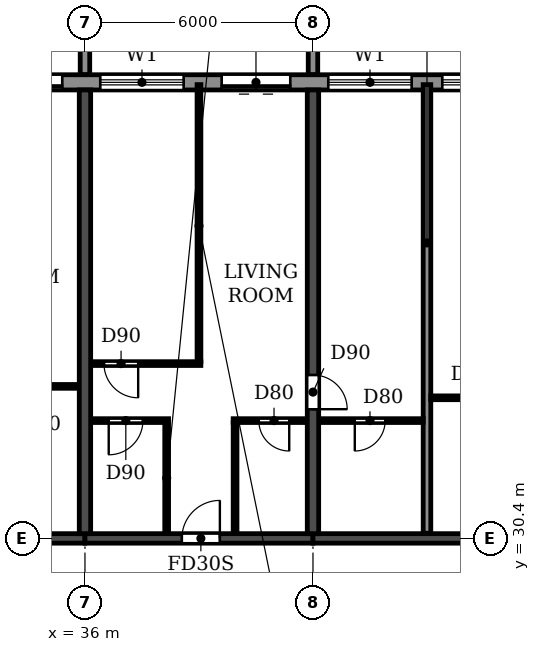
"""IFC4 building model, lengths in metres.
Left out: names, types, materials, properties, quantities, classifications, styles, units other than length and angle.
Written with IfcOpenShell. Run it as: python <this file> out.ifc"""

import sys

from ifc_helpers import new_model, si_unit, direction, frame, frame_2d, origin, place, context, subcontext, project, spatial, polyline, rectangle, outline, extrude, source, transform, mapped, element, fill, save


model = new_model("IFC4")
c1 = context("Model", 3, precision=1e-05, world=origin(), true_north=direction((0.0, 1.0)))
c2 = subcontext(c1, "Body", "Model", "MODEL_VIEW")
j1 = project(units=[si_unit("LENGTHUNIT", "METRE"), si_unit("PLANEANGLEUNIT", "RADIAN")], contexts=[c1])
p1 = place(None, origin())
s1 = spatial("IfcSite", under=j1, at=p1, CompositionType="ELEMENT")
p2 = place(p1, origin())
s2 = spatial("IfcBuilding", under=s1, at=p2, CompositionType="ELEMENT")
p3 = place(p2, frame((0.0, 0.0, 125.7)))
s3 = spatial("IfcBuildingStorey", under=s2, at=p3, CompositionType="ELEMENT", Elevation=125.7)
p4 = place(p3, frame((36.0, 30.525, 0.0), z_axis=(0.0, 0.0, 1.0), x_axis=(0.0, 1.0, 0.0)))
e1 = element("IfcWall", 1, at=p4, inside=s3, PredefinedType="SHEAR", context=c2, shape_type="SweptSolid", body=[
    extrude(rectangle(XDim=11.675, YDim=0.3, at=frame_2d((5.837, 0.0))), origin(), (0.0, 0.0, 1.0), 3.07),
])
p5 = place(p3, frame((42.0, 30.525, 0.0), z_axis=(0.0, 0.0, 1.0), x_axis=(0.0, 1.0, 0.0)))
e2 = element("IfcWall", 2, at=p5, inside=s3, PredefinedType="SHEAR", context=c2, shape_type="SweptSolid", body=[
    extrude(rectangle(XDim=11.675, YDim=0.3, at=frame_2d((5.837, 0.0))), origin(), (0.0, 0.0, 1.0), 3.07),
])
p6 = place(p5, frame((3.275, 0.0, 0.0)))
e3 = element("IfcOpeningElement", 3, at=p6, cuts=e2, PredefinedType="OPENING", context=c2, shape_type="SweptSolid", body=[
    extrude(rectangle(XDim=0.9, YDim=2.1, at=frame_2d((0.45, 1.05))), frame((0.0, 0.16, 0.0), z_axis=(0.0, -1.0, 0.0), x_axis=(1.0, 0.0, 0.0)), (0.0, 0.0, 1.0), 0.32),
])
p7 = place(p3, frame((30.0, 30.4, 0.0), z_axis=(0.0, 0.0, 1.0), x_axis=(1.0, 0.0, 0.0)))
e4 = element("IfcWall", 4, at=p7, inside=s3, PredefinedType="SHEAR", context=c2, shape_type="SweptSolid", body=[
    extrude(rectangle(XDim=6.0, YDim=0.25, at=frame_2d((3.0, 0.0))), origin(), (0.0, 0.0, 1.0), 2.47),
])
p8 = place(p7, frame((2.45, 0.0, 0.0)))
e5 = element("IfcOpeningElement", 5, at=p8, cuts=e4, PredefinedType="OPENING", context=c2, shape_type="SweptSolid", body=[
    extrude(rectangle(XDim=1.0, YDim=2.1, at=frame_2d((0.5, 1.05))), frame((0.0, 0.135, 0.0), z_axis=(0.0, -1.0, 0.0), x_axis=(1.0, 0.0, 0.0)), (0.0, 0.0, 1.0), 0.27),
])
p9 = place(p3, frame((36.0, 30.4, 0.0), z_axis=(0.0, 0.0, 1.0), x_axis=(1.0, 0.0, 0.0)))
e6 = element("IfcWall", 6, at=p9, inside=s3, PredefinedType="SHEAR", context=c2, shape_type="SweptSolid", body=[
    extrude(rectangle(XDim=6.0, YDim=0.25, at=frame_2d((3.0, 0.0))), origin(), (0.0, 0.0, 1.0), 2.47),
])
p10 = place(p9, frame((2.55, 0.0, 0.0)))
e7 = element("IfcOpeningElement", 7, at=p10, cuts=e6, PredefinedType="OPENING", context=c2, shape_type="SweptSolid", body=[
    extrude(rectangle(XDim=1.0, YDim=2.1, at=frame_2d((0.5, 1.05))), frame((0.0, 0.135, 0.0), z_axis=(0.0, -1.0, 0.0), x_axis=(1.0, 0.0, 0.0)), (0.0, 0.0, 1.0), 0.27),
])
p11 = place(p3, frame((42.0, 30.4, 0.0), z_axis=(0.0, 0.0, 1.0), x_axis=(1.0, 0.0, 0.0)))
e8 = element("IfcWall", 8, at=p11, inside=s3, PredefinedType="SHEAR", context=c2, shape_type="SweptSolid", body=[
    extrude(rectangle(XDim=6.0, YDim=0.25, at=frame_2d((3.0, 0.0))), origin(), (0.0, 0.0, 1.0), 2.47),
])
p12 = place(p3, frame((85.317, 42.4, 0.0), z_axis=(0.0, 0.0, 1.0), x_axis=(-1.0, 0.0, 0.0)))
e9 = element("IfcWall", 9, at=p12, inside=s3, PredefinedType="STANDARD", context=c2, shape_type="SweptSolid", body=[
    extrude(rectangle(XDim=68.634, YDim=0.4, at=frame_2d((34.317, 0.0))), origin(), (0.0, 0.0, 1.0), 3.07),
])
p13 = place(p12, frame((64.717, 0.0, 0.9)))
e10 = element("IfcOpeningElement", 10, at=p13, cuts=e9, PredefinedType="OPENING", context=c2, shape_type="SweptSolid", body=[
    extrude(rectangle(XDim=2.2, YDim=1.5, at=frame_2d((1.1, 0.75))), frame((0.0, 0.21, 0.0), z_axis=(0.0, -1.0, 0.0), x_axis=(1.0, 0.0, 0.0)), (0.0, 0.0, 1.0), 0.42),
])
p14 = place(p12, frame((61.917, 0.0, 0.0)))
e11 = element("IfcOpeningElement", 11, at=p14, cuts=e9, PredefinedType="OPENING", context=c2, shape_type="SweptSolid", body=[
    extrude(rectangle(XDim=1.8, YDim=2.4, at=frame_2d((0.9, 1.2))), frame((0.0, 0.21, 0.0), z_axis=(0.0, -1.0, 0.0), x_axis=(1.0, 0.0, 0.0)), (0.0, 0.0, 1.0), 0.42),
])
p15 = place(p12, frame((58.717, 0.0, 0.9)))
e12 = element("IfcOpeningElement", 12, at=p15, cuts=e9, PredefinedType="OPENING", context=c2, shape_type="SweptSolid", body=[
    extrude(rectangle(XDim=2.2, YDim=1.5, at=frame_2d((1.1, 0.75))), frame((0.0, 0.21, 0.0), z_axis=(0.0, -1.0, 0.0), x_axis=(1.0, 0.0, 0.0)), (0.0, 0.0, 1.0), 0.42),
])
p16 = place(p12, frame((55.917, 0.0, 0.0)))
e13 = element("IfcOpeningElement", 13, at=p16, cuts=e9, PredefinedType="OPENING", context=c2, shape_type="SweptSolid", body=[
    extrude(rectangle(XDim=1.8, YDim=2.4, at=frame_2d((0.9, 1.2))), frame((0.0, 0.21, 0.0), z_axis=(0.0, -1.0, 0.0), x_axis=(1.0, 0.0, 0.0)), (0.0, 0.0, 1.0), 0.42),
])
p17 = place(p12, frame((52.717, 0.0, 0.9)))
e14 = element("IfcOpeningElement", 14, at=p17, cuts=e9, PredefinedType="OPENING", context=c2, shape_type="SweptSolid", body=[
    extrude(rectangle(XDim=2.2, YDim=1.5, at=frame_2d((1.1, 0.75))), frame((0.0, 0.21, 0.0), z_axis=(0.0, -1.0, 0.0), x_axis=(1.0, 0.0, 0.0)), (0.0, 0.0, 1.0), 0.42),
])
p18 = place(p12, frame((49.917, 0.0, 0.0)))
e15 = element("IfcOpeningElement", 15, at=p18, cuts=e9, PredefinedType="OPENING", context=c2, shape_type="SweptSolid", body=[
    extrude(rectangle(XDim=1.8, YDim=2.4, at=frame_2d((0.9, 1.2))), frame((0.0, 0.21, 0.0), z_axis=(0.0, -1.0, 0.0), x_axis=(1.0, 0.0, 0.0)), (0.0, 0.0, 1.0), 0.42),
])
p19 = place(p12, frame((46.717, 0.0, 0.9)))
e16 = element("IfcOpeningElement", 16, at=p19, cuts=e9, PredefinedType="OPENING", context=c2, shape_type="SweptSolid", body=[
    extrude(rectangle(XDim=2.2, YDim=1.5, at=frame_2d((1.1, 0.75))), frame((0.0, 0.21, 0.0), z_axis=(0.0, -1.0, 0.0), x_axis=(1.0, 0.0, 0.0)), (0.0, 0.0, 1.0), 0.42),
])
p20 = place(p12, frame((43.917, 0.0, 0.0)))
e17 = element("IfcOpeningElement", 17, at=p20, cuts=e9, PredefinedType="OPENING", context=c2, shape_type="SweptSolid", body=[
    extrude(rectangle(XDim=1.8, YDim=2.4, at=frame_2d((0.9, 1.2))), frame((0.0, 0.21, 0.0), z_axis=(0.0, -1.0, 0.0), x_axis=(1.0, 0.0, 0.0)), (0.0, 0.0, 1.0), 0.42),
])
p21 = place(p12, frame((40.717, 0.0, 0.9)))
e18 = element("IfcOpeningElement", 18, at=p21, cuts=e9, PredefinedType="OPENING", context=c2, shape_type="SweptSolid", body=[
    extrude(rectangle(XDim=2.2, YDim=1.5, at=frame_2d((1.1, 0.75))), frame((0.0, 0.21, 0.0), z_axis=(0.0, -1.0, 0.0), x_axis=(1.0, 0.0, 0.0)), (0.0, 0.0, 1.0), 0.42),
])
p22 = place(p12, frame((37.717, 0.0, 0.9)))
e19 = element("IfcOpeningElement", 19, at=p22, cuts=e9, PredefinedType="OPENING", context=c2, shape_type="SweptSolid", body=[
    extrude(rectangle(XDim=2.2, YDim=1.5, at=frame_2d((1.1, 0.75))), frame((0.0, 0.21, 0.0), z_axis=(0.0, -1.0, 0.0), x_axis=(1.0, 0.0, 0.0)), (0.0, 0.0, 1.0), 0.42),
])
p23 = place(p12, frame((34.917, 0.0, 0.0)))
e20 = element("IfcOpeningElement", 20, at=p23, cuts=e9, PredefinedType="OPENING", context=c2, shape_type="SweptSolid", body=[
    extrude(rectangle(XDim=1.8, YDim=2.4, at=frame_2d((0.9, 1.2))), frame((0.0, 0.21, 0.0), z_axis=(0.0, -1.0, 0.0), x_axis=(1.0, 0.0, 0.0)), (0.0, 0.0, 1.0), 0.42),
])
p24 = place(p12, frame((31.717, 0.0, 0.9)))
e21 = element("IfcOpeningElement", 21, at=p24, cuts=e9, PredefinedType="OPENING", context=c2, shape_type="SweptSolid", body=[
    extrude(rectangle(XDim=2.2, YDim=1.5, at=frame_2d((1.1, 0.75))), frame((0.0, 0.21, 0.0), z_axis=(0.0, -1.0, 0.0), x_axis=(1.0, 0.0, 0.0)), (0.0, 0.0, 1.0), 0.42),
])
p25 = place(p12, frame((28.717, 0.0, 0.9)))
e22 = element("IfcOpeningElement", 22, at=p25, cuts=e9, PredefinedType="OPENING", context=c2, shape_type="SweptSolid", body=[
    extrude(rectangle(XDim=2.2, YDim=1.5, at=frame_2d((1.1, 0.75))), frame((0.0, 0.21, 0.0), z_axis=(0.0, -1.0, 0.0), x_axis=(1.0, 0.0, 0.0)), (0.0, 0.0, 1.0), 0.42),
])
p26 = place(p12, frame((25.717, 0.0, 0.9)))
e23 = element("IfcOpeningElement", 23, at=p26, cuts=e9, PredefinedType="OPENING", context=c2, shape_type="SweptSolid", body=[
    extrude(rectangle(XDim=2.2, YDim=1.5, at=frame_2d((1.1, 0.75))), frame((0.0, 0.21, 0.0), z_axis=(0.0, -1.0, 0.0), x_axis=(1.0, 0.0, 0.0)), (0.0, 0.0, 1.0), 0.42),
])
p27 = place(p12, frame((22.717, 0.0, 0.9)))
e24 = element("IfcOpeningElement", 24, at=p27, cuts=e9, PredefinedType="OPENING", context=c2, shape_type="SweptSolid", body=[
    extrude(rectangle(XDim=2.2, YDim=1.5, at=frame_2d((1.1, 0.75))), frame((0.0, 0.21, 0.0), z_axis=(0.0, -1.0, 0.0), x_axis=(1.0, 0.0, 0.0)), (0.0, 0.0, 1.0), 0.42),
])
p28 = place(p12, frame((19.917, 0.0, 0.0)))
e25 = element("IfcOpeningElement", 25, at=p28, cuts=e9, PredefinedType="OPENING", context=c2, shape_type="SweptSolid", body=[
    extrude(rectangle(XDim=1.8, YDim=2.4, at=frame_2d((0.9, 1.2))), frame((0.0, 0.21, 0.0), z_axis=(0.0, -1.0, 0.0), x_axis=(1.0, 0.0, 0.0)), (0.0, 0.0, 1.0), 0.42),
])
p29 = place(p12, frame((16.917, 0.0, 0.0)))
e26 = element("IfcOpeningElement", 26, at=p29, cuts=e9, PredefinedType="OPENING", context=c2, shape_type="SweptSolid", body=[
    extrude(rectangle(XDim=1.8, YDim=2.4, at=frame_2d((0.9, 1.2))), frame((0.0, 0.21, 0.0), z_axis=(0.0, -1.0, 0.0), x_axis=(1.0, 0.0, 0.0)), (0.0, 0.0, 1.0), 0.42),
])
p30 = place(p12, frame((13.717, 0.0, 0.9)))
e27 = element("IfcOpeningElement", 27, at=p30, cuts=e9, PredefinedType="OPENING", context=c2, shape_type="SweptSolid", body=[
    extrude(rectangle(XDim=2.2, YDim=1.5, at=frame_2d((1.1, 0.75))), frame((0.0, 0.21, 0.0), z_axis=(0.0, -1.0, 0.0), x_axis=(1.0, 0.0, 0.0)), (0.0, 0.0, 1.0), 0.42),
])
p31 = place(p12, frame((10.717, 0.0, 0.9)))
e28 = element("IfcOpeningElement", 28, at=p31, cuts=e9, PredefinedType="OPENING", context=c2, shape_type="SweptSolid", body=[
    extrude(rectangle(XDim=2.2, YDim=1.5, at=frame_2d((1.1, 0.75))), frame((0.0, 0.21, 0.0), z_axis=(0.0, -1.0, 0.0), x_axis=(1.0, 0.0, 0.0)), (0.0, 0.0, 1.0), 0.42),
])
p32 = place(p12, frame((7.717, 0.0, 0.9)))
e29 = element("IfcOpeningElement", 29, at=p32, cuts=e9, PredefinedType="OPENING", context=c2, shape_type="SweptSolid", body=[
    extrude(rectangle(XDim=2.2, YDim=1.5, at=frame_2d((1.1, 0.75))), frame((0.0, 0.21, 0.0), z_axis=(0.0, -1.0, 0.0), x_axis=(1.0, 0.0, 0.0)), (0.0, 0.0, 1.0), 0.42),
])
p33 = place(p12, frame((4.917, 0.0, 0.0)))
e30 = element("IfcOpeningElement", 30, at=p33, cuts=e9, PredefinedType="OPENING", context=c2, shape_type="SweptSolid", body=[
    extrude(rectangle(XDim=1.8, YDim=2.4, at=frame_2d((0.9, 1.2))), frame((0.0, 0.21, 0.0), z_axis=(0.0, -1.0, 0.0), x_axis=(1.0, 0.0, 0.0)), (0.0, 0.0, 1.0), 0.42),
])
p34 = place(p12, frame((1.717, 0.0, 0.9)))
e31 = element("IfcOpeningElement", 31, at=p34, cuts=e9, PredefinedType="OPENING", context=c2, shape_type="SweptSolid", body=[
    extrude(rectangle(XDim=2.2, YDim=1.5, at=frame_2d((1.1, 0.75))), frame((0.0, 0.21, 0.0), z_axis=(0.0, -1.0, 0.0), x_axis=(1.0, 0.0, 0.0)), (0.0, 0.0, 1.0), 0.42),
])
m1 = source(origin(), c2, "Body", "SweptSolid", [
    extrude(outline(polyline([(0.0, 0.0), (0.25, 0.0), (0.25, 3.1), (0.0, 3.1), (0.0, 0.0)])), origin(), (0.0, 0.0, 1.0), 3.1),
])
for number, where in (
    (32, (35.875, 42.6, 0.0)),
    (33, (41.875, 42.6, 0.0)),
):
    element("IfcWall", number, at=place(p3, frame(where)), inside=s3, PredefinedType="STANDARD", context=c2, shape_type="MappedRepresentation", body=[
        mapped(m1, transform((0.0, 0.0, 0.0))),
    ])
p35 = place(p3, frame((45.0, 30.535, 0.0), z_axis=(0.0, 0.0, 1.0), x_axis=(0.0, 1.0, 0.0)))
e34 = element("IfcWall", 34, at=p35, inside=s3, PredefinedType="PARTITIONING", context=c2, shape_type="SweptSolid", body=[
    extrude(rectangle(XDim=11.805, YDim=0.2, at=frame_2d((5.903, 0.0))), origin(), (0.0, 0.0, 1.0), 3.07),
])
p36 = place(p3, frame((36.16, 33.5, 0.0), z_axis=(0.0, 0.0, 1.0), x_axis=(1.0, 0.0, 0.0)))
e35 = element("IfcWall", 35, at=p36, inside=s3, PredefinedType="PARTITIONING", context=c2, shape_type="SweptSolid", body=[
    extrude(rectangle(XDim=2.04, YDim=0.1, at=frame_2d((1.02, 0.0))), origin(), (0.0, 0.0, 1.0), 3.07),
])
p37 = place(p36, frame((0.465, 0.0, 0.0)))
e36 = element("IfcOpeningElement", 36, at=p37, cuts=e35, PredefinedType="OPENING", context=c2, shape_type="SweptSolid", body=[
    extrude(rectangle(XDim=0.9, YDim=2.1, at=frame_2d((0.45, 1.05))), frame((0.0, 0.06, 0.0), z_axis=(0.0, -1.0, 0.0), x_axis=(1.0, 0.0, 0.0)), (0.0, 0.0, 1.0), 0.12),
])
p38 = place(p3, frame((39.9, 33.5, 0.0), z_axis=(0.0, 0.0, 1.0), x_axis=(1.0, 0.0, 0.0)))
e37 = element("IfcWall", 37, at=p38, inside=s3, PredefinedType="PARTITIONING", context=c2, shape_type="SweptSolid", body=[
    extrude(rectangle(XDim=1.94, YDim=0.1, at=frame_2d((0.97, 0.0))), origin(), (0.0, 0.0, 1.0), 3.07),
])
p39 = place(p38, frame((0.675, 0.0, 0.0)))
e38 = element("IfcOpeningElement", 38, at=p39, cuts=e37, PredefinedType="OPENING", context=c2, shape_type="SweptSolid", body=[
    extrude(rectangle(XDim=0.8, YDim=2.1, at=frame_2d((0.4, 1.05))), frame((0.0, 0.06, 0.0), z_axis=(0.0, -1.0, 0.0), x_axis=(1.0, 0.0, 0.0)), (0.0, 0.0, 1.0), 0.12),
])
p40 = place(p3, frame((42.16, 33.5, 0.0), z_axis=(0.0, 0.0, 1.0), x_axis=(1.0, 0.0, 0.0)))
e39 = element("IfcWall", 39, at=p40, inside=s3, PredefinedType="PARTITIONING", context=c2, shape_type="SweptSolid", body=[
    extrude(rectangle(XDim=2.74, YDim=0.1, at=frame_2d((1.37, 0.0))), origin(), (0.0, 0.0, 1.0), 3.07),
])
p41 = place(p40, frame((0.94, 0.0, 0.0)))
e40 = element("IfcOpeningElement", 40, at=p41, cuts=e39, PredefinedType="OPENING", context=c2, shape_type="SweptSolid", body=[
    extrude(rectangle(XDim=0.8, YDim=2.1, at=frame_2d((0.4, 1.05))), frame((0.0, 0.06, 0.0), z_axis=(0.0, -1.0, 0.0), x_axis=(1.0, 0.0, 0.0)), (0.0, 0.0, 1.0), 0.12),
])
p42 = place(p3, frame((45.1, 34.1, 0.0), z_axis=(0.0, 0.0, 1.0), x_axis=(1.0, 0.0, 0.0)))
e41 = element("IfcWall", 41, at=p42, inside=s3, PredefinedType="PARTITIONING", context=c2, shape_type="SweptSolid", body=[
    extrude(rectangle(XDim=2.74, YDim=0.1, at=frame_2d((1.37, 0.0))), origin(), (0.0, 0.0, 1.0), 3.07),
])
p43 = place(p42, frame((1.0, 0.0, 0.0)))
e42 = element("IfcOpeningElement", 42, at=p43, cuts=e41, PredefinedType="OPENING", context=c2, shape_type="SweptSolid", body=[
    extrude(rectangle(XDim=0.8, YDim=2.1, at=frame_2d((0.4, 1.05))), frame((0.0, 0.06, 0.0), z_axis=(0.0, -1.0, 0.0), x_axis=(1.0, 0.0, 0.0)), (0.0, 0.0, 1.0), 0.12),
])
p44 = place(p3, frame((33.8, 34.4, 0.0), z_axis=(0.0, 0.0, 1.0), x_axis=(1.0, 0.0, 0.0)))
e43 = element("IfcWall", 43, at=p44, inside=s3, PredefinedType="PARTITIONING", context=c2, shape_type="SweptSolid", body=[
    extrude(rectangle(XDim=2.04, YDim=0.1, at=frame_2d((1.02, 0.0))), origin(), (0.0, 0.0, 1.0), 3.07),
])
p45 = place(p3, frame((36.16, 35.0, 0.0), z_axis=(0.0, 0.0, 1.0), x_axis=(1.0, 0.0, 0.0)))
e44 = element("IfcWall", 44, at=p45, inside=s3, PredefinedType="PARTITIONING", context=c2, shape_type="SweptSolid", body=[
    extrude(rectangle(XDim=2.89, YDim=0.1, at=frame_2d((1.445, 0.0))), origin(), (0.0, 0.0, 1.0), 3.07),
])
p46 = place(p45, frame((0.34, 0.0, 0.0)))
e45 = element("IfcOpeningElement", 45, at=p46, cuts=e44, PredefinedType="OPENING", context=c2, shape_type="SweptSolid", body=[
    extrude(rectangle(XDim=0.9, YDim=2.1, at=frame_2d((0.45, 1.05))), frame((0.0, 0.06, 0.0), z_axis=(0.0, -1.0, 0.0), x_axis=(1.0, 0.0, 0.0)), (0.0, 0.0, 1.0), 0.12),
])
p47 = place(p3, frame((38.15, 30.535, 0.0), z_axis=(0.0, 0.0, 1.0), x_axis=(0.0, 1.0, 0.0)))
e46 = element("IfcWall", 46, at=p47, inside=s3, PredefinedType="PARTITIONING", context=c2, shape_type="SweptSolid", body=[
    extrude(rectangle(XDim=2.915, YDim=0.1, at=frame_2d((1.458, 0.0))), origin(), (0.0, 0.0, 1.0), 3.07),
])
p48 = place(p3, frame((39.0, 35.05, 0.0), z_axis=(0.0, 0.0, 1.0), x_axis=(0.0, 1.0, 0.0)))
e47 = element("IfcWall", 47, at=p48, inside=s3, PredefinedType="PARTITIONING", context=c2, shape_type="SweptSolid", body=[
    extrude(rectangle(XDim=7.29, YDim=0.1, at=frame_2d((3.645, 0.0))), origin(), (0.0, 0.0, 1.0), 3.07),
])
p49 = place(p3, frame((39.95, 30.535, 0.0), z_axis=(0.0, 0.0, 1.0), x_axis=(0.0, 1.0, 0.0)))
e48 = element("IfcWall", 48, at=p49, inside=s3, PredefinedType="PARTITIONING", context=c2, shape_type="SweptSolid", body=[
    extrude(rectangle(XDim=2.915, YDim=0.1, at=frame_2d((1.458, 0.0))), origin(), (0.0, 0.0, 1.0), 3.07),
])
p50 = place(p18, origin())
e49 = element("IfcDoor", 49, at=p50, inside=s3, OperationType="DOUBLE_DOOR_SLIDING", PredefinedType="DOOR", context=c2, shape_type="SweptSolid", body=[
    extrude(rectangle(XDim=1.8, YDim=2.4, at=frame_2d((0.9, 1.2))), frame((0.0, 0.025, 0.0), z_axis=(0.0, -1.0, 0.0), x_axis=(1.0, 0.0, 0.0)), (0.0, 0.0, 1.0), 0.05),
])
fill(e15, e49)
p51 = place(p19, origin())
e50 = element("IfcWindow", 50, at=p51, inside=s3, PartitioningType="DOUBLE_PANEL_HORIZONTAL", PredefinedType="WINDOW", context=c2, shape_type="SweptSolid", body=[
    extrude(rectangle(XDim=2.2, YDim=1.5, at=frame_2d((1.1, 0.75))), frame((0.0, 0.03, 0.0), z_axis=(0.0, -1.0, 0.0), x_axis=(1.0, 0.0, 0.0)), (0.0, 0.0, 1.0), 0.06),
])
fill(e16, e50)
p52 = place(p20, origin())
e51 = element("IfcDoor", 51, at=p52, inside=s3, OperationType="DOUBLE_DOOR_SLIDING", PredefinedType="DOOR", context=c2, shape_type="SweptSolid", body=[
    extrude(rectangle(XDim=1.8, YDim=2.4, at=frame_2d((0.9, 1.2))), frame((0.0, 0.025, 0.0), z_axis=(0.0, -1.0, 0.0), x_axis=(1.0, 0.0, 0.0)), (0.0, 0.0, 1.0), 0.05),
])
fill(e17, e51)
p53 = place(p21, origin())
e52 = element("IfcWindow", 52, at=p53, inside=s3, PartitioningType="DOUBLE_PANEL_HORIZONTAL", PredefinedType="WINDOW", context=c2, shape_type="SweptSolid", body=[
    extrude(rectangle(XDim=2.2, YDim=1.5, at=frame_2d((1.1, 0.75))), frame((0.0, 0.03, 0.0), z_axis=(0.0, -1.0, 0.0), x_axis=(1.0, 0.0, 0.0)), (0.0, 0.0, 1.0), 0.06),
])
fill(e18, e52)
p54 = place(p22, origin())
e53 = element("IfcWindow", 53, at=p54, inside=s3, PartitioningType="DOUBLE_PANEL_HORIZONTAL", PredefinedType="WINDOW", context=c2, shape_type="SweptSolid", body=[
    extrude(rectangle(XDim=2.2, YDim=1.5, at=frame_2d((1.1, 0.75))), frame((0.0, 0.03, 0.0), z_axis=(0.0, -1.0, 0.0), x_axis=(1.0, 0.0, 0.0)), (0.0, 0.0, 1.0), 0.06),
])
fill(e19, e53)
p55 = place(p41, frame((0.8, 0.0, 0.0), z_axis=(0.0, 0.0, 1.0), x_axis=(-1.0, 0.0, 0.0)))
e54 = element("IfcDoor", 54, at=p55, inside=s3, OperationType="SINGLE_SWING_RIGHT", PredefinedType="DOOR", context=c2, shape_type="SweptSolid", body=[
    extrude(rectangle(XDim=0.8, YDim=2.1, at=frame_2d((0.4, 1.05))), frame((0.0, 0.025, 0.0), z_axis=(0.0, -1.0, 0.0), x_axis=(1.0, 0.0, 0.0)), (0.0, 0.0, 1.0), 0.05),
])
fill(e40, e54)
p56 = place(p46, frame((0.9, 0.0, 0.0), z_axis=(0.0, 0.0, 1.0), x_axis=(-1.0, 0.0, 0.0)))
e55 = element("IfcDoor", 55, at=p56, inside=s3, OperationType="SINGLE_SWING_LEFT", PredefinedType="DOOR", context=c2, shape_type="SweptSolid", body=[
    extrude(rectangle(XDim=0.9, YDim=2.1, at=frame_2d((0.45, 1.05))), frame((0.0, 0.025, 0.0), z_axis=(0.0, -1.0, 0.0), x_axis=(1.0, 0.0, 0.0)), (0.0, 0.0, 1.0), 0.05),
])
fill(e45, e55)
p57 = place(p37, frame((0.9, 0.0, 0.0), z_axis=(0.0, 0.0, 1.0), x_axis=(-1.0, 0.0, 0.0)))
e56 = element("IfcDoor", 56, at=p57, inside=s3, OperationType="SINGLE_SWING_RIGHT", PredefinedType="DOOR", context=c2, shape_type="SweptSolid", body=[
    extrude(rectangle(XDim=0.9, YDim=2.1, at=frame_2d((0.45, 1.05))), frame((0.0, 0.025, 0.0), z_axis=(0.0, -1.0, 0.0), x_axis=(1.0, 0.0, 0.0)), (0.0, 0.0, 1.0), 0.05),
])
fill(e36, e56)
p58 = place(p10, origin())
e57 = element("IfcDoor", 57, at=p58, inside=s3, OperationType="SINGLE_SWING_RIGHT", PredefinedType="DOOR", context=c2, shape_type="SweptSolid", body=[
    extrude(rectangle(XDim=1.0, YDim=2.1, at=frame_2d((0.5, 1.05))), frame((0.0, 0.025, 0.0), z_axis=(0.0, -1.0, 0.0), x_axis=(1.0, 0.0, 0.0)), (0.0, 0.0, 1.0), 0.05),
])
fill(e7, e57)
p59 = place(p39, frame((0.8, 0.0, 0.0), z_axis=(0.0, 0.0, 1.0), x_axis=(-1.0, 0.0, 0.0)))
e58 = element("IfcDoor", 58, at=p59, inside=s3, OperationType="SINGLE_SWING_LEFT", PredefinedType="DOOR", context=c2, shape_type="SweptSolid", body=[
    extrude(rectangle(XDim=0.8, YDim=2.1, at=frame_2d((0.4, 1.05))), frame((0.0, 0.025, 0.0), z_axis=(0.0, -1.0, 0.0), x_axis=(1.0, 0.0, 0.0)), (0.0, 0.0, 1.0), 0.05),
])
fill(e38, e58)
p60 = place(p6, frame((0.9, 0.0, 0.0), z_axis=(0.0, 0.0, 1.0), x_axis=(-1.0, 0.0, 0.0)))
e59 = element("IfcDoor", 59, at=p60, inside=s3, OperationType="SINGLE_SWING_RIGHT", PredefinedType="DOOR", context=c2, shape_type="SweptSolid", body=[
    extrude(rectangle(XDim=0.9, YDim=2.1, at=frame_2d((0.45, 1.05))), frame((0.0, 0.025, 0.0), z_axis=(0.0, -1.0, 0.0), x_axis=(1.0, 0.0, 0.0)), (0.0, 0.0, 1.0), 0.05),
])
fill(e3, e59)
save(model, sys.argv[1])
